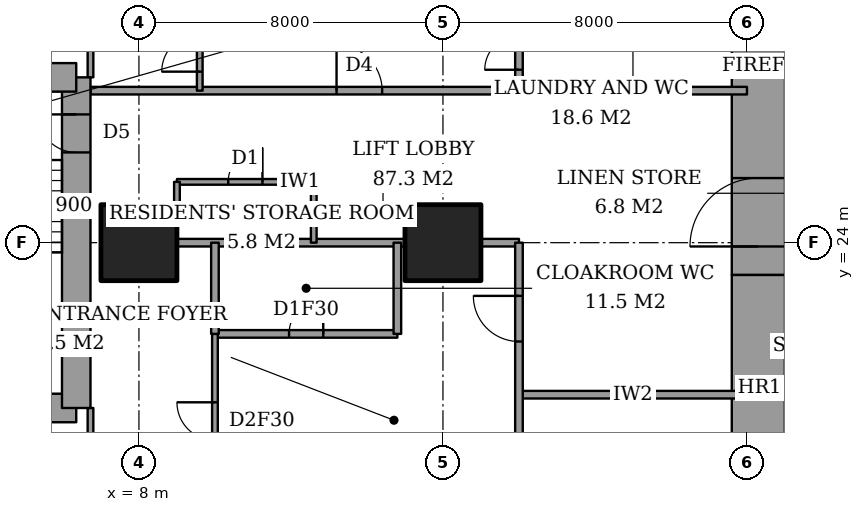
"""IFC4 building model, lengths in metres.
Left out: names, types, materials, properties, quantities, classifications, styles, units other than length and angle.
Written with IfcOpenShell. Run it as: python <this file> out.ifc"""

import sys

from ifc_helpers import new_model, si_unit, direction, frame, frame_2d, origin, origin_2d, place, context, subcontext, project, spatial, rectangle, extrude, element, fill, save


model = new_model("IFC4")
c1 = context("Model", 3, precision=1e-05, world=origin(), true_north=direction((0.0, 1.0)))
c2 = subcontext(c1, "Body", "Model", "MODEL_VIEW")
j1 = project(units=[si_unit("LENGTHUNIT", "METRE"), si_unit("PLANEANGLEUNIT", "RADIAN")], contexts=[c1])
p1 = place(None, origin())
s1 = spatial("IfcSite", under=j1, at=p1, CompositionType="ELEMENT")
p2 = place(p1, origin())
s2 = spatial("IfcBuilding", under=s1, at=p2, CompositionType="ELEMENT")
p3 = place(p2, frame((0.0, 0.0, 51.2)))
s3 = spatial("IfcBuildingStorey", under=s2, at=p3, CompositionType="ELEMENT", Elevation=51.2)
for number, where, z_axis, x_axis in (
    (1, (8.0, 24.0, 0.0), (0.0, 0.0, 1.0), (1.0, 0.0, 0.0)),
    (2, (16.0, 24.0, 0.0), (0.0, 0.0, 1.0), (1.0, 0.0, 0.0)),
):
    element("IfcColumn", number, at=place(p3, frame(where, z_axis=z_axis, x_axis=x_axis)), inside=s3, PredefinedType="COLUMN", context=c2, shape_type="SweptSolid", body=[
        extrude(rectangle(XDim=2.0, YDim=2.0, at=origin_2d()), origin(), (0.0, 0.0, 1.0), 3.6),
    ])
p4 = place(p3, frame((24.3, 13.0, 0.0), z_axis=(0.0, 0.0, 1.0), x_axis=(0.0, 1.0, 0.0)))
e3 = element("IfcWall", 3, at=p4, inside=s3, PredefinedType="SHEAR", context=c2, shape_type="SweptSolid", body=[
    extrude(rectangle(XDim=10.15, YDim=1.4, at=frame_2d((5.075, 0.0))), origin(), (0.0, 0.0, 1.0), 3.6),
])
p5 = place(p3, frame((24.3, 23.15, 0.0), z_axis=(0.0, 0.0, 1.0), x_axis=(0.0, 1.0, 0.0)))
e4 = element("IfcWall", 4, at=p5, inside=s3, PredefinedType="SHEAR", context=c2, shape_type="SweptSolid", body=[
    extrude(rectangle(XDim=11.85, YDim=1.4, at=frame_2d((5.925, 0.0))), origin(), (0.0, 0.0, 1.0), 3.6),
])
p6 = place(p5, frame((0.75, 0.0, 0.0)))
e5 = element("IfcOpeningElement", 5, at=p6, cuts=e4, PredefinedType="OPENING", context=c2, shape_type="SweptSolid", body=[
    extrude(rectangle(XDim=1.8, YDim=2.4, at=frame_2d((0.9, 1.2))), frame((0.0, 0.71, 0.0), z_axis=(0.0, -1.0, 0.0), x_axis=(1.0, 0.0, 0.0)), (0.0, 0.0, 1.0), 1.42),
])
p7 = place(p3, frame((1.9, 19.65, 0.0), z_axis=(0.0, 0.0, 1.0), x_axis=(1.0, 0.0, 0.0)))
e6 = element("IfcWall", 6, at=p7, inside=s3, PredefinedType="SHEAR", context=c2, shape_type="SweptSolid", body=[
    extrude(rectangle(XDim=4.45, YDim=0.75, at=frame_2d((2.225, 0.0))), origin(), (0.0, 0.0, 1.0), 3.6),
])
p8 = place(p3, frame((6.35, 19.65, 0.0), z_axis=(0.0, 0.0, 1.0), x_axis=(0.0, 1.0, 0.0)))
e7 = element("IfcWall", 7, at=p8, inside=s3, PredefinedType="SHEAR", context=c2, shape_type="SweptSolid", body=[
    extrude(rectangle(XDim=8.7, YDim=0.75, at=frame_2d((4.35, 0.0))), origin(), (0.0, 0.0, 1.0), 3.6),
])
p9 = place(p8, frame((6.725, 0.0, 0.0)))
e8 = element("IfcOpeningElement", 8, at=p9, cuts=e7, PredefinedType="OPENING", context=c2, shape_type="SweptSolid", body=[
    extrude(rectangle(XDim=1.0, YDim=2.1, at=frame_2d((0.5, 1.05))), frame((0.0, 0.385, 0.0), z_axis=(0.0, -1.0, 0.0), x_axis=(1.0, 0.0, 0.0)), (0.0, 0.0, 1.0), 0.77),
])
p10 = place(p3, frame((6.35, 28.35, 0.0), z_axis=(0.0, 0.0, 1.0), x_axis=(-1.0, 0.0, 0.0)))
e9 = element("IfcWall", 9, at=p10, inside=s3, PredefinedType="SHEAR", context=c2, shape_type="SweptSolid", body=[
    extrude(rectangle(XDim=4.45, YDim=0.75, at=frame_2d((2.225, 0.0))), origin(), (0.0, 0.0, 1.0), 3.6),
])
p11 = place(p3, frame((18.0, 20.0, 0.0), z_axis=(0.0, 0.0, 1.0), x_axis=(1.0, 0.0, 0.0)))
e10 = element("IfcWall", 10, at=p11, inside=s3, PredefinedType="PARTITIONING", context=c2, shape_type="SweptSolid", body=[
    extrude(rectangle(XDim=6.0, YDim=0.2, at=frame_2d((3.0, 0.0))), origin(), (0.0, 0.0, 1.0), 3.35),
])
p12 = place(p3, frame((10.0, 21.6, 0.0), z_axis=(0.0, 0.0, 1.0), x_axis=(1.0, 0.0, 0.0)))
e11 = element("IfcWall", 11, at=p12, inside=s3, PredefinedType="PARTITIONING", context=c2, shape_type="SweptSolid", body=[
    extrude(rectangle(XDim=4.8, YDim=0.2, at=frame_2d((2.4, 0.0))), origin(), (0.0, 0.0, 1.0), 3.35),
])
p13 = place(p12, frame((1.95, 0.0, 0.0)))
e12 = element("IfcOpeningElement", 12, at=p13, cuts=e11, PredefinedType="OPENING", context=c2, shape_type="SweptSolid", body=[
    extrude(rectangle(XDim=0.9, YDim=2.1, at=frame_2d((0.45, 1.05))), frame((0.0, 0.11, 0.0), z_axis=(0.0, -1.0, 0.0), x_axis=(1.0, 0.0, 0.0)), (0.0, 0.0, 1.0), 0.22),
])
p14 = place(p3, frame((9.0, 24.0, 0.0), z_axis=(0.0, 0.0, 1.0), x_axis=(1.0, 0.0, 0.0)))
e13 = element("IfcWall", 13, at=p14, inside=s3, PredefinedType="PARTITIONING", context=c2, shape_type="SweptSolid", body=[
    extrude(rectangle(XDim=6.0, YDim=0.2, at=frame_2d((3.0, 0.0))), origin(), (0.0, 0.0, 1.0), 3.35),
])
p15 = place(p3, frame((17.0, 24.0, 0.0), z_axis=(0.0, 0.0, 1.0), x_axis=(1.0, 0.0, 0.0)))
e14 = element("IfcWall", 14, at=p15, inside=s3, PredefinedType="PARTITIONING", context=c2, shape_type="SweptSolid", body=[
    extrude(rectangle(XDim=1.0, YDim=0.2, at=frame_2d((0.5, 0.0))), origin(), (0.0, 0.0, 1.0), 3.35),
])
p16 = place(p3, frame((9.0, 25.6, 0.0), z_axis=(0.0, 0.0, 1.0), x_axis=(1.0, 0.0, 0.0)))
e15 = element("IfcWall", 15, at=p16, inside=s3, PredefinedType="PARTITIONING", context=c2, shape_type="SweptSolid", body=[
    extrude(rectangle(XDim=3.6, YDim=0.15, at=frame_2d((1.8, 0.0))), origin(), (0.0, 0.0, 1.0), 3.35),
])
p17 = place(p16, frame((1.35, 0.0, 0.0)))
e16 = element("IfcOpeningElement", 16, at=p17, cuts=e15, PredefinedType="OPENING", context=c2, shape_type="SweptSolid", body=[
    extrude(rectangle(XDim=0.9, YDim=2.1, at=frame_2d((0.45, 1.05))), frame((0.0, 0.085, 0.0), z_axis=(0.0, -1.0, 0.0), x_axis=(1.0, 0.0, 0.0)), (0.0, 0.0, 1.0), 0.17),
])
p18 = place(p3, frame((6.725, 28.0, 0.0), z_axis=(0.0, 0.0, 1.0), x_axis=(1.0, 0.0, 0.0)))
e17 = element("IfcWall", 17, at=p18, inside=s3, PredefinedType="PARTITIONING", context=c2, shape_type="SweptSolid", body=[
    extrude(rectangle(XDim=17.275, YDim=0.2, at=frame_2d((8.637, 0.0))), origin(), (0.0, 0.0, 1.0), 3.35),
])
p19 = place(p18, frame((6.475, 0.0, 0.0)))
e18 = element("IfcOpeningElement", 18, at=p19, cuts=e17, PredefinedType="OPENING", context=c2, shape_type="SweptSolid", body=[
    extrude(rectangle(XDim=1.2, YDim=2.4, at=frame_2d((0.6, 1.2))), frame((0.0, 0.11, 0.0), z_axis=(0.0, -1.0, 0.0), x_axis=(1.0, 0.0, 0.0)), (0.0, 0.0, 1.0), 0.22),
])
p20 = place(p3, frame((6.725, 17.2, 0.0), z_axis=(0.0, 0.0, 1.0), x_axis=(0.0, 1.0, 0.0)))
e19 = element("IfcWall", 19, at=p20, inside=s3, PredefinedType="PARTITIONING", context=c2, shape_type="SweptSolid", body=[
    extrude(rectangle(XDim=2.45, YDim=0.15, at=frame_2d((1.225, 0.0))), origin(), (0.0, 0.0, 1.0), 3.35),
])
p21 = place(p20, frame((0.538, 0.0, 0.0)))
e20 = element("IfcOpeningElement", 20, at=p21, cuts=e19, PredefinedType="OPENING", context=c2, shape_type="SweptSolid", body=[
    extrude(rectangle(XDim=1.0, YDim=2.1, at=frame_2d((0.5, 1.05))), frame((0.0, 0.085, 0.0), z_axis=(0.0, -1.0, 0.0), x_axis=(1.0, 0.0, 0.0)), (0.0, 0.0, 1.0), 0.17),
])
p22 = place(p3, frame((6.725, 28.35, 0.0), z_axis=(0.0, 0.0, 1.0), x_axis=(0.0, 1.0, 0.0)))
e21 = element("IfcWall", 21, at=p22, inside=s3, PredefinedType="PARTITIONING", context=c2, shape_type="SweptSolid", body=[
    extrude(rectangle(XDim=2.45, YDim=0.15, at=frame_2d((1.225, 0.0))), origin(), (0.0, 0.0, 1.0), 3.35),
])
p23 = place(p22, frame((0.913, 0.0, 0.0)))
e22 = element("IfcOpeningElement", 22, at=p23, cuts=e21, PredefinedType="OPENING", context=c2, shape_type="SweptSolid", body=[
    extrude(rectangle(XDim=1.0, YDim=2.1, at=frame_2d((0.5, 1.05))), frame((0.0, 0.085, 0.0), z_axis=(0.0, -1.0, 0.0), x_axis=(1.0, 0.0, 0.0)), (0.0, 0.0, 1.0), 0.17),
])
p24 = place(p3, frame((9.0, 25.0, 0.0), z_axis=(0.0, 0.0, 1.0), x_axis=(0.0, 1.0, 0.0)))
e23 = element("IfcWall", 23, at=p24, inside=s3, PredefinedType="PARTITIONING", context=c2, shape_type="SweptSolid", body=[
    extrude(rectangle(XDim=0.6, YDim=0.15, at=frame_2d((0.3, 0.0))), origin(), (0.0, 0.0, 1.0), 3.35),
])
p25 = place(p3, frame((9.6, 28.0, 0.0), z_axis=(0.0, 0.0, 1.0), x_axis=(0.0, 1.0, 0.0)))
e24 = element("IfcWall", 24, at=p25, inside=s3, PredefinedType="PARTITIONING", context=c2, shape_type="SweptSolid", body=[
    extrude(rectangle(XDim=9.4, YDim=0.15, at=frame_2d((4.7, 0.0))), origin(), (0.0, 0.0, 1.0), 3.35),
])
p26 = place(p25, frame((0.5, 0.0, 0.0)))
e25 = element("IfcOpeningElement", 25, at=p26, cuts=e24, PredefinedType="OPENING", context=c2, shape_type="SweptSolid", body=[
    extrude(rectangle(XDim=1.0, YDim=2.1, at=frame_2d((0.5, 1.05))), frame((0.0, 0.085, 0.0), z_axis=(0.0, -1.0, 0.0), x_axis=(1.0, 0.0, 0.0)), (0.0, 0.0, 1.0), 0.17),
])
p27 = place(p3, frame((10.0, 21.6, 0.0), z_axis=(0.0, 0.0, 1.0), x_axis=(0.0, 1.0, 0.0)))
e26 = element("IfcWall", 26, at=p27, inside=s3, PredefinedType="PARTITIONING", context=c2, shape_type="SweptSolid", body=[
    extrude(rectangle(XDim=2.4, YDim=0.2, at=frame_2d((1.2, 0.0))), origin(), (0.0, 0.0, 1.0), 3.35),
])
p28 = place(p3, frame((10.0, 10.6, 0.0), z_axis=(0.0, 0.0, 1.0), x_axis=(0.0, 1.0, 0.0)))
e27 = element("IfcWall", 27, at=p28, inside=s3, PredefinedType="PARTITIONING", context=c2, shape_type="SweptSolid", body=[
    extrude(rectangle(XDim=11.0, YDim=0.15, at=frame_2d((5.5, 0.0))), origin(), (0.0, 0.0, 1.0), 3.35),
])
p29 = place(p28, frame((8.2, 0.0, 0.0)))
e28 = element("IfcOpeningElement", 28, at=p29, cuts=e27, PredefinedType="OPENING", context=c2, shape_type="SweptSolid", body=[
    extrude(rectangle(XDim=1.0, YDim=2.1, at=frame_2d((0.5, 1.05))), frame((0.0, 0.085, 0.0), z_axis=(0.0, -1.0, 0.0), x_axis=(1.0, 0.0, 0.0)), (0.0, 0.0, 1.0), 0.17),
])
p30 = place(p3, frame((12.6, 24.0, 0.0), z_axis=(0.0, 0.0, 1.0), x_axis=(0.0, 1.0, 0.0)))
e29 = element("IfcWall", 29, at=p30, inside=s3, PredefinedType="PARTITIONING", context=c2, shape_type="SweptSolid", body=[
    extrude(rectangle(XDim=1.6, YDim=0.15, at=frame_2d((0.8, 0.0))), origin(), (0.0, 0.0, 1.0), 3.35),
])
p31 = place(p3, frame((14.8, 21.6, 0.0), z_axis=(0.0, 0.0, 1.0), x_axis=(0.0, 1.0, 0.0)))
e30 = element("IfcWall", 30, at=p31, inside=s3, PredefinedType="PARTITIONING", context=c2, shape_type="SweptSolid", body=[
    extrude(rectangle(XDim=2.4, YDim=0.2, at=frame_2d((1.2, 0.0))), origin(), (0.0, 0.0, 1.0), 3.35),
])
p32 = place(p3, frame((18.0, 17.0, 0.0), z_axis=(0.0, 0.0, 1.0), x_axis=(0.0, 1.0, 0.0)))
e31 = element("IfcWall", 31, at=p32, inside=s3, PredefinedType="PARTITIONING", context=c2, shape_type="SweptSolid", body=[
    extrude(rectangle(XDim=7.0, YDim=0.2, at=frame_2d((3.5, 0.0))), origin(), (0.0, 0.0, 1.0), 3.35),
])
p33 = place(p32, frame((4.4, 0.0, 0.0)))
e32 = element("IfcOpeningElement", 32, at=p33, cuts=e31, PredefinedType="OPENING", context=c2, shape_type="SweptSolid", body=[
    extrude(rectangle(XDim=1.2, YDim=2.4, at=frame_2d((0.6, 1.2))), frame((0.0, 0.11, 0.0), z_axis=(0.0, -1.0, 0.0), x_axis=(1.0, 0.0, 0.0)), (0.0, 0.0, 1.0), 0.22),
])
p34 = place(p32, frame((1.05, 0.0, 0.0)))
e33 = element("IfcOpeningElement", 33, at=p34, cuts=e31, PredefinedType="OPENING", context=c2, shape_type="SweptSolid", body=[
    extrude(rectangle(XDim=0.9, YDim=2.1, at=frame_2d((0.45, 1.05))), frame((0.0, 0.11, 0.0), z_axis=(0.0, -1.0, 0.0), x_axis=(1.0, 0.0, 0.0)), (0.0, 0.0, 1.0), 0.22),
])
p35 = place(p3, frame((18.0, 28.0, 0.0), z_axis=(0.0, 0.0, 1.0), x_axis=(0.0, 1.0, 0.0)))
e34 = element("IfcWall", 34, at=p35, inside=s3, PredefinedType="PARTITIONING", context=c2, shape_type="SweptSolid", body=[
    extrude(rectangle(XDim=3.1, YDim=0.2, at=frame_2d((1.55, 0.0))), origin(), (0.0, 0.0, 1.0), 3.35),
])
p36 = place(p35, frame((0.55, 0.0, 0.0)))
e35 = element("IfcOpeningElement", 35, at=p36, cuts=e34, PredefinedType="OPENING", context=c2, shape_type="SweptSolid", body=[
    extrude(rectangle(XDim=0.9, YDim=2.1, at=frame_2d((0.45, 1.05))), frame((0.0, 0.11, 0.0), z_axis=(0.0, -1.0, 0.0), x_axis=(1.0, 0.0, 0.0)), (0.0, 0.0, 1.0), 0.22),
])
p37 = place(p29, origin())
e36 = element("IfcDoor", 36, at=p37, inside=s3, OperationType="SINGLE_SWING_LEFT", PredefinedType="DOOR", context=c2, shape_type="SweptSolid", body=[
    extrude(rectangle(XDim=1.0, YDim=2.1, at=frame_2d((0.5, 1.05))), frame((0.0, 0.025, 0.0), z_axis=(0.0, -1.0, 0.0), x_axis=(1.0, 0.0, 0.0)), (0.0, 0.0, 1.0), 0.05),
])
fill(e28, e36)
p38 = place(p13, origin())
e37 = element("IfcDoor", 37, at=p38, inside=s3, OperationType="SINGLE_SWING_LEFT", PredefinedType="DOOR", context=c2, shape_type="SweptSolid", body=[
    extrude(rectangle(XDim=0.9, YDim=2.1, at=frame_2d((0.45, 1.05))), frame((0.0, 0.025, 0.0), z_axis=(0.0, -1.0, 0.0), x_axis=(1.0, 0.0, 0.0)), (0.0, 0.0, 1.0), 0.05),
])
fill(e12, e37)
p39 = place(p33, origin())
e38 = element("IfcDoor", 38, at=p39, inside=s3, OperationType="SINGLE_SWING_LEFT", PredefinedType="DOOR", context=c2, shape_type="SweptSolid", body=[
    extrude(rectangle(XDim=1.2, YDim=2.4, at=frame_2d((0.6, 1.2))), frame((0.0, 0.025, 0.0), z_axis=(0.0, -1.0, 0.0), x_axis=(1.0, 0.0, 0.0)), (0.0, 0.0, 1.0), 0.05),
])
fill(e32, e38)
p40 = place(p26, origin())
e39 = element("IfcDoor", 39, at=p40, inside=s3, OperationType="SINGLE_SWING_RIGHT", PredefinedType="DOOR", context=c2, shape_type="SweptSolid", body=[
    extrude(rectangle(XDim=1.0, YDim=2.1, at=frame_2d((0.5, 1.05))), frame((0.0, 0.025, 0.0), z_axis=(0.0, -1.0, 0.0), x_axis=(1.0, 0.0, 0.0)), (0.0, 0.0, 1.0), 0.05),
])
fill(e25, e39)
p41 = place(p19, origin())
e40 = element("IfcDoor", 40, at=p41, inside=s3, OperationType="SINGLE_SWING_RIGHT", PredefinedType="DOOR", context=c2, shape_type="SweptSolid", body=[
    extrude(rectangle(XDim=1.2, YDim=2.4, at=frame_2d((0.6, 1.2))), frame((0.0, 0.025, 0.0), z_axis=(0.0, -1.0, 0.0), x_axis=(1.0, 0.0, 0.0)), (0.0, 0.0, 1.0), 0.05),
])
fill(e18, e40)
p42 = place(p36, origin())
e41 = element("IfcDoor", 41, at=p42, inside=s3, OperationType="SINGLE_SWING_RIGHT", PredefinedType="DOOR", context=c2, shape_type="SweptSolid", body=[
    extrude(rectangle(XDim=0.9, YDim=2.1, at=frame_2d((0.45, 1.05))), frame((0.0, 0.025, 0.0), z_axis=(0.0, -1.0, 0.0), x_axis=(1.0, 0.0, 0.0)), (0.0, 0.0, 1.0), 0.05),
])
fill(e35, e41)
p43 = place(p17, origin())
e42 = element("IfcDoor", 42, at=p43, inside=s3, OperationType="SINGLE_SWING_LEFT", PredefinedType="DOOR", context=c2, shape_type="SweptSolid", body=[
    extrude(rectangle(XDim=0.9, YDim=2.1, at=frame_2d((0.45, 1.05))), frame((0.0, 0.025, 0.0), z_axis=(0.0, -1.0, 0.0), x_axis=(1.0, 0.0, 0.0)), (0.0, 0.0, 1.0), 0.05),
])
fill(e16, e42)
p44 = place(p6, origin())
e43 = element("IfcDoor", 43, at=p44, inside=s3, OperationType="DOUBLE_DOOR_DOUBLE_SWING", PredefinedType="DOOR", context=c2, shape_type="SweptSolid", body=[
    extrude(rectangle(XDim=1.8, YDim=2.4, at=frame_2d((0.9, 1.2))), frame((0.0, 0.025, 0.0), z_axis=(0.0, -1.0, 0.0), x_axis=(1.0, 0.0, 0.0)), (0.0, 0.0, 1.0), 0.05),
])
fill(e5, e43)
p45 = place(p9, origin())
e44 = element("IfcDoor", 44, at=p45, inside=s3, OperationType="SINGLE_SWING_LEFT", PredefinedType="DOOR", context=c2, shape_type="SweptSolid", body=[
    extrude(rectangle(XDim=1.0, YDim=2.1, at=frame_2d((0.5, 1.05))), frame((0.0, 0.025, 0.0), z_axis=(0.0, -1.0, 0.0), x_axis=(1.0, 0.0, 0.0)), (0.0, 0.0, 1.0), 0.05),
])
fill(e8, e44)
save(model, sys.argv[1])
